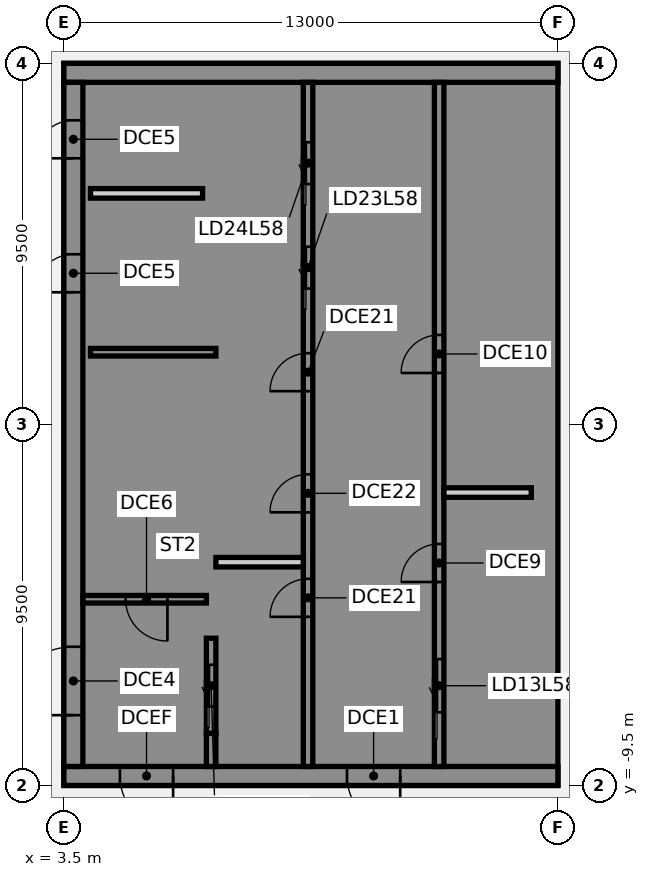
"""IFC4 building model, lengths in metres.
Left out: names, types, materials, properties, quantities, classifications, styles, units other than length and angle.
Written with IfcOpenShell. Run it as: python <this file> out.ifc"""

import sys

from ifc_helpers import new_model, si_unit, direction, frame, frame_2d, origin, place, context, subcontext, project, spatial, polyline, rectangle, outline, extrude, element, fill, save


model = new_model("IFC4")
c1 = context("Model", 3, precision=1e-05, world=origin(), true_north=direction((0.0, 1.0)))
c2 = subcontext(c1, "Body", "Model", "MODEL_VIEW")
j1 = project(units=[si_unit("LENGTHUNIT", "METRE"), si_unit("PLANEANGLEUNIT", "RADIAN")], contexts=[c1])
p1 = place(None, origin())
s1 = spatial("IfcSite", under=j1, at=p1, CompositionType="ELEMENT")
p2 = place(p1, origin())
s2 = spatial("IfcBuilding", under=s1, at=p2, CompositionType="ELEMENT")
p3 = place(p2, frame((0.0, 0.0, 230.7)))
s3 = spatial("IfcBuildingStorey", under=s2, at=p3, CompositionType="ELEMENT", Elevation=230.7)
p4 = place(p3, frame((16.5, -9.25, 0.0), z_axis=(0.0, 0.0, 1.0), x_axis=(-1.0, 0.0, 0.0)))
e1 = element("IfcWall", 1, at=p4, inside=s3, PredefinedType="SHEAR", context=c2, shape_type="SweptSolid", body=[
    extrude(rectangle(XDim=13.0, YDim=0.5, at=frame_2d((6.5, 0.0))), origin(), (0.0, 0.0, 1.0), 3.46),
])
p5 = place(p4, frame((4.15, 0.0, 0.0)))
e2 = element("IfcOpeningElement", 2, at=p5, cuts=e1, PredefinedType="OPENING", context=c2, shape_type="SweptSolid", body=[
    extrude(rectangle(XDim=1.4, YDim=2.1, at=frame_2d((0.7, 1.05))), frame((0.0, 0.26, 0.0), z_axis=(0.0, -1.0, 0.0), x_axis=(1.0, 0.0, 0.0)), (0.0, 0.0, 1.0), 0.52),
])
p6 = place(p4, frame((10.125, 0.0, 0.0)))
e3 = element("IfcOpeningElement", 3, at=p6, cuts=e1, PredefinedType="OPENING", context=c2, shape_type="SweptSolid", body=[
    extrude(rectangle(XDim=1.4, YDim=2.1, at=frame_2d((0.7, 1.05))), frame((0.0, 0.26, 0.0), z_axis=(0.0, -1.0, 0.0), x_axis=(1.0, 0.0, 0.0)), (0.0, 0.0, 1.0), 0.52),
])
p7 = place(p3, origin())
e4 = element("IfcWall", 4, at=p7, inside=s3, PredefinedType="SHEAR", context=c2, shape_type="SweptSolid", body=[
    extrude(outline(polyline([(13.5, -8.125), (13.5, -9.0), (16.0, -9.0), (16.5, -9.0), (16.5, 9.0), (16.0, 9.0), (13.5, 9.0), (13.5, 8.125), (16.0, 8.125), (16.0, 5.625), (13.5, 5.625), (13.5, 5.375), (16.0, 5.375), (16.0, -5.375), (13.5, -5.375), (13.5, -5.625), (16.0, -5.625), (16.0, -8.125), (13.5, -8.125)])), origin(), (0.0, 0.0, 1.0), 3.46),
])
p8 = place(p3, frame((16.5, 9.25, 0.0), z_axis=(0.0, 0.0, 1.0), x_axis=(-1.0, 0.0, 0.0)))
e5 = element("IfcWall", 5, at=p8, inside=s3, PredefinedType="SHEAR", context=c2, shape_type="SweptSolid", body=[
    extrude(rectangle(XDim=13.0, YDim=0.5, at=frame_2d((6.5, 0.0))), origin(), (0.0, 0.0, 1.0), 3.46),
])
p9 = place(p3, origin())
e6 = element("IfcWall", 6, at=p9, inside=s3, PredefinedType="SHEAR", context=c2, shape_type="SweptSolid", body=[
    extrude(outline(polyline([(9.8, -5.375), (7.5, -5.375), (7.5, 2.625), (9.8, 2.625), (9.8, 2.875), (7.5, 2.875), (7.5, 5.375), (9.8, 5.375), (9.8, 5.625), (7.5, 5.625), (7.5, 8.125), (9.8, 8.125), (9.8, 9.0), (7.5, 9.0), (7.25, 9.0), (7.25, -5.625), (7.5, -5.625), (9.8, -5.625), (9.8, -5.375)])), origin(), (0.0, 0.0, 1.0), 3.46),
])
p10 = place(p3, origin())
e7 = element("IfcWall", 7, at=p10, inside=s3, PredefinedType="SHEAR", context=c2, shape_type="SweptSolid", body=[
    extrude(outline(polyline([(7.5, -8.125), (7.5, -9.0), (9.8, -9.0), (9.8, -8.125), (9.8, -5.625), (9.55, -5.625), (9.55, -8.125), (7.5, -8.125)])), origin(), (0.0, 0.0, 1.0), 3.46),
])
p11 = place(p3, frame((7.375, -9.0, 0.0), z_axis=(0.0, 0.0, 1.0), x_axis=(0.0, 1.0, 0.0)))
e8 = element("IfcWall", 8, at=p11, inside=s3, PredefinedType="SHEAR", context=c2, shape_type="SweptSolid", body=[
    extrude(rectangle(XDim=0.875, YDim=0.25, at=frame_2d((0.438, 0.0))), origin(), (0.0, 0.0, 1.0), 3.46),
])
p12 = place(p3, frame((7.5, 1.9, 0.0), z_axis=(0.0, 0.0, 1.0), x_axis=(-1.0, 0.0, 0.0)))
e9 = element("IfcWall", 9, at=p12, inside=s3, PredefinedType="SHEAR", context=c2, shape_type="SweptSolid", body=[
    extrude(rectangle(XDim=3.3, YDim=0.2, at=frame_2d((1.65, 0.0))), origin(), (0.0, 0.0, 1.0), 3.46),
])
p13 = place(p3, frame((13.375, -9.0, 0.0), z_axis=(0.0, 0.0, 1.0), x_axis=(0.0, 1.0, 0.0)))
e10 = element("IfcWall", 10, at=p13, inside=s3, PredefinedType="SHEAR", context=c2, shape_type="SweptSolid", body=[
    extrude(rectangle(XDim=18.0, YDim=0.25, at=frame_2d((9.0, 0.0))), origin(), (0.0, 0.0, 1.0), 3.46),
])
p14 = place(p13, frame((1.425, 0.0, 0.0)))
e11 = element("IfcOpeningElement", 11, at=p14, cuts=e10, PredefinedType="OPENING", context=c2, shape_type="SweptSolid", body=[
    extrude(rectangle(XDim=1.4, YDim=2.1, at=frame_2d((0.7, 1.05))), frame((0.0, 0.135, 0.0), z_axis=(0.0, -1.0, 0.0), x_axis=(1.0, 0.0, 0.0)), (0.0, 0.0, 1.0), 0.27),
])
p15 = place(p13, frame((4.854, 0.0, 0.0)))
e12 = element("IfcOpeningElement", 12, at=p15, cuts=e10, PredefinedType="OPENING", context=c2, shape_type="SweptSolid", body=[
    extrude(rectangle(XDim=1.0, YDim=2.1, at=frame_2d((0.5, 1.05))), frame((0.0, 0.135, 0.0), z_axis=(0.0, -1.0, 0.0), x_axis=(1.0, 0.0, 0.0)), (0.0, 0.0, 1.0), 0.27),
])
p16 = place(p13, frame((10.354, 0.0, 0.0)))
e13 = element("IfcOpeningElement", 13, at=p16, cuts=e10, PredefinedType="OPENING", context=c2, shape_type="SweptSolid", body=[
    extrude(rectangle(XDim=1.0, YDim=2.1, at=frame_2d((0.5, 1.05))), frame((0.0, 0.135, 0.0), z_axis=(0.0, -1.0, 0.0), x_axis=(1.0, 0.0, 0.0)), (0.0, 0.0, 1.0), 0.27),
])
p17 = place(p3, frame((9.925, -9.0, 0.0), z_axis=(0.0, 0.0, 1.0), x_axis=(0.0, 1.0, 0.0)))
e14 = element("IfcWall", 14, at=p17, inside=s3, PredefinedType="SHEAR", context=c2, shape_type="SweptSolid", body=[
    extrude(rectangle(XDim=18.0, YDim=0.25, at=frame_2d((9.0, 0.0))), origin(), (0.0, 0.0, 1.0), 3.46),
])
p18 = place(p17, frame((12.575, 0.0, 0.0)))
e15 = element("IfcOpeningElement", 15, at=p18, cuts=e14, PredefinedType="OPENING", context=c2, shape_type="SweptSolid", body=[
    extrude(rectangle(XDim=1.1, YDim=2.1, at=frame_2d((0.55, 1.05))), frame((0.0, 0.135, 0.0), z_axis=(0.0, -1.0, 0.0), x_axis=(1.0, 0.0, 0.0)), (0.0, 0.0, 1.0), 0.27),
])
p19 = place(p17, frame((15.325, 0.0, 0.0)))
e16 = element("IfcOpeningElement", 16, at=p19, cuts=e14, PredefinedType="OPENING", context=c2, shape_type="SweptSolid", body=[
    extrude(rectangle(XDim=1.1, YDim=2.1, at=frame_2d((0.55, 1.05))), frame((0.0, 0.135, 0.0), z_axis=(0.0, -1.0, 0.0), x_axis=(1.0, 0.0, 0.0)), (0.0, 0.0, 1.0), 0.27),
])
p20 = place(p17, frame((3.938, 0.0, 0.0)))
e17 = element("IfcOpeningElement", 17, at=p20, cuts=e14, PredefinedType="OPENING", context=c2, shape_type="SweptSolid", body=[
    extrude(rectangle(XDim=1.0, YDim=2.1, at=frame_2d((0.5, 1.05))), frame((0.0, 0.135, 0.0), z_axis=(0.0, -1.0, 0.0), x_axis=(1.0, 0.0, 0.0)), (0.0, 0.0, 1.0), 0.27),
])
p21 = place(p17, frame((6.688, 0.0, 0.0)))
e18 = element("IfcOpeningElement", 18, at=p21, cuts=e14, PredefinedType="OPENING", context=c2, shape_type="SweptSolid", body=[
    extrude(rectangle(XDim=1.0, YDim=2.1, at=frame_2d((0.5, 1.05))), frame((0.0, 0.135, 0.0), z_axis=(0.0, -1.0, 0.0), x_axis=(1.0, 0.0, 0.0)), (0.0, 0.0, 1.0), 0.27),
])
p22 = place(p17, frame((9.875, 0.0, 0.0)))
e19 = element("IfcOpeningElement", 19, at=p22, cuts=e14, PredefinedType="OPENING", context=c2, shape_type="SweptSolid", body=[
    extrude(rectangle(XDim=1.0, YDim=2.1, at=frame_2d((0.5, 1.05))), frame((0.0, 0.135, 0.0), z_axis=(0.0, -1.0, 0.0), x_axis=(1.0, 0.0, 0.0)), (0.0, 0.0, 1.0), 0.27),
])
p23 = place(p3, frame((7.375, -8.125, 0.0), z_axis=(0.0, 0.0, 1.0), x_axis=(0.0, 1.0, 0.0)))
e20 = element("IfcWall", 20, at=p23, inside=s3, PredefinedType="SHEAR", context=c2, shape_type="SweptSolid", body=[
    extrude(rectangle(XDim=2.5, YDim=0.25, at=frame_2d((1.25, 0.0))), origin(), (0.0, 0.0, 1.0), 3.46),
])
p24 = place(p23, frame((0.7, 0.0, 0.0)))
e21 = element("IfcOpeningElement", 21, at=p24, cuts=e20, PredefinedType="OPENING", context=c2, shape_type="SweptSolid", body=[
    extrude(rectangle(XDim=1.1, YDim=2.1, at=frame_2d((0.55, 1.05))), frame((0.0, 0.135, 0.0), z_axis=(0.0, -1.0, 0.0), x_axis=(1.0, 0.0, 0.0)), (0.0, 0.0, 1.0), 0.27),
])
p25 = place(p3, frame((3.75, -9.0, 0.0), z_axis=(0.0, 0.0, 1.0), x_axis=(0.0, 1.0, 0.0)))
e22 = element("IfcWall", 22, at=p25, inside=s3, PredefinedType="SHEAR", context=c2, shape_type="SweptSolid", body=[
    extrude(rectangle(XDim=18.0, YDim=0.5, at=frame_2d((9.0, 0.0))), origin(), (0.0, 0.0, 1.0), 3.46),
])
p26 = place(p25, frame((1.35, 0.0, 0.0)))
e23 = element("IfcOpeningElement", 23, at=p26, cuts=e22, PredefinedType="OPENING", context=c2, shape_type="SweptSolid", body=[
    extrude(rectangle(XDim=1.8, YDim=2.1, at=frame_2d((0.9, 1.05))), frame((0.0, 0.26, 0.0), z_axis=(0.0, -1.0, 0.0), x_axis=(1.0, 0.0, 0.0)), (0.0, 0.0, 1.0), 0.52),
])
p27 = place(p25, frame((12.478, 0.0, 0.0)))
e24 = element("IfcOpeningElement", 24, at=p27, cuts=e22, PredefinedType="OPENING", context=c2, shape_type="SweptSolid", body=[
    extrude(rectangle(XDim=1.0, YDim=2.1, at=frame_2d((0.5, 1.05))), frame((0.0, 0.26, 0.0), z_axis=(0.0, -1.0, 0.0), x_axis=(1.0, 0.0, 0.0)), (0.0, 0.0, 1.0), 0.52),
])
p28 = place(p25, frame((16.002, 0.0, 0.0)))
e25 = element("IfcOpeningElement", 25, at=p28, cuts=e22, PredefinedType="OPENING", context=c2, shape_type="SweptSolid", body=[
    extrude(rectangle(XDim=1.0, YDim=2.1, at=frame_2d((0.5, 1.05))), frame((0.0, 0.26, 0.0), z_axis=(0.0, -1.0, 0.0), x_axis=(1.0, 0.0, 0.0)), (0.0, 0.0, 1.0), 0.52),
])
p29 = place(p3, frame((7.15, 6.08, 0.0), z_axis=(0.0, 0.0, 1.0), x_axis=(-1.0, 0.0, 0.0)))
e26 = element("IfcWall", 26, at=p29, inside=s3, PredefinedType="PARTITIONING", context=c2, shape_type="SweptSolid", body=[
    extrude(rectangle(XDim=2.95, YDim=0.25, at=frame_2d((1.475, 0.0))), origin(), (0.0, 0.0, 1.0), 3.46),
])
p30 = place(p3, frame((7.25, -4.6, 0.0), z_axis=(0.0, 0.0, 1.0), x_axis=(-1.0, 0.0, 0.0)))
e27 = element("IfcWall", 27, at=p30, inside=s3, PredefinedType="SHEAR", context=c2, shape_type="SweptSolid", body=[
    extrude(rectangle(XDim=3.25, YDim=0.2, at=frame_2d((1.625, 0.0))), origin(), (0.0, 0.0, 1.0), 3.46),
])
p31 = place(p30, frame((1.025, 0.0, 0.0)))
e28 = element("IfcOpeningElement", 28, at=p31, cuts=e27, PredefinedType="OPENING", context=c2, shape_type="SweptSolid", body=[
    extrude(rectangle(XDim=1.1, YDim=2.1, at=frame_2d((0.55, 1.05))), frame((0.0, 0.11, 0.0), z_axis=(0.0, -1.0, 0.0), x_axis=(1.0, 0.0, 0.0)), (0.0, 0.0, 1.0), 0.22),
])
for number, where, z_axis, x_axis in (
    (29, (15.8, -1.792, 0.0), (0.0, 0.0, 1.0), (-1.0, 0.0, 0.0)),
    (30, (9.8, -3.625, 0.0), (0.0, 0.0, 1.0), (-1.0, 0.0, 0.0)),
):
    element("IfcWall", number, at=place(p3, frame(where, z_axis=z_axis, x_axis=x_axis)), inside=s3, PredefinedType="PARTITIONING", context=c2, shape_type="SweptSolid", body=[
        extrude(rectangle(XDim=2.3, YDim=0.25, at=frame_2d((1.15, 0.0))), origin(), (0.0, 0.0, 1.0), 3.46),
    ])
p32 = place(p5, origin())
e31 = element("IfcDoor", 31, at=p32, inside=s3, OperationType="SINGLE_SWING_LEFT", PredefinedType="DOOR", context=c2, shape_type="SweptSolid", body=[
    extrude(rectangle(XDim=1.4, YDim=2.1, at=frame_2d((0.7, 1.05))), frame((0.0, 0.025, 0.0), z_axis=(0.0, -1.0, 0.0), x_axis=(1.0, 0.0, 0.0)), (0.0, 0.0, 1.0), 0.05),
])
fill(e2, e31)
p33 = place(p6, origin())
e32 = element("IfcDoor", 32, at=p33, inside=s3, OperationType="SINGLE_SWING_LEFT", PredefinedType="DOOR", context=c2, shape_type="SweptSolid", body=[
    extrude(rectangle(XDim=1.4, YDim=2.1, at=frame_2d((0.7, 1.05))), frame((0.0, 0.025, 0.0), z_axis=(0.0, -1.0, 0.0), x_axis=(1.0, 0.0, 0.0)), (0.0, 0.0, 1.0), 0.05),
])
fill(e3, e32)
p34 = place(p26, origin())
e33 = element("IfcDoor", 33, at=p34, inside=s3, OperationType="SINGLE_SWING_LEFT", PredefinedType="DOOR", context=c2, shape_type="SweptSolid", body=[
    extrude(rectangle(XDim=1.8, YDim=2.1, at=frame_2d((0.9, 1.05))), frame((0.0, 0.025, 0.0), z_axis=(0.0, -1.0, 0.0), x_axis=(1.0, 0.0, 0.0)), (0.0, 0.0, 1.0), 0.05),
])
fill(e23, e33)
p35 = place(p27, origin())
e34 = element("IfcDoor", 34, at=p35, inside=s3, OperationType="SINGLE_SWING_LEFT", PredefinedType="DOOR", context=c2, shape_type="SweptSolid", body=[
    extrude(rectangle(XDim=1.0, YDim=2.1, at=frame_2d((0.5, 1.05))), frame((0.0, -0.175, 0.0), z_axis=(0.0, -1.0, 0.0), x_axis=(1.0, 0.0, 0.0)), (0.0, 0.0, 1.0), 0.05),
])
fill(e24, e34)
p36 = place(p28, origin())
e35 = element("IfcDoor", 35, at=p36, inside=s3, OperationType="SINGLE_SWING_LEFT", PredefinedType="DOOR", context=c2, shape_type="SweptSolid", body=[
    extrude(rectangle(XDim=1.0, YDim=2.1, at=frame_2d((0.5, 1.05))), frame((0.0, -0.175, 0.0), z_axis=(0.0, -1.0, 0.0), x_axis=(1.0, 0.0, 0.0)), (0.0, 0.0, 1.0), 0.05),
])
fill(e25, e35)
p37 = place(p31, origin())
e36 = element("IfcDoor", 36, at=p37, inside=s3, OperationType="SINGLE_SWING_LEFT", PredefinedType="DOOR", context=c2, shape_type="SweptSolid", body=[
    extrude(rectangle(XDim=1.1, YDim=2.1, at=frame_2d((0.55, 1.05))), frame((0.0, 0.025, 0.0), z_axis=(0.0, -1.0, 0.0), x_axis=(1.0, 0.0, 0.0)), (0.0, 0.0, 1.0), 0.05),
])
fill(e28, e36)
p38 = place(p14, origin())
e37 = element("IfcDoor", 37, at=p38, inside=s3, OperationType="SLIDING_TO_LEFT", PredefinedType="DOOR", context=c2, shape_type="SweptSolid", body=[
    extrude(rectangle(XDim=1.4, YDim=2.1, at=frame_2d((0.7, 1.05))), frame((0.0, 0.025, 0.0), z_axis=(0.0, -1.0, 0.0), x_axis=(1.0, 0.0, 0.0)), (0.0, 0.0, 1.0), 0.05),
])
fill(e11, e37)
p39 = place(p24, origin())
e38 = element("IfcDoor", 38, at=p39, inside=s3, OperationType="SLIDING_TO_LEFT", PredefinedType="DOOR", context=c2, shape_type="SweptSolid", body=[
    extrude(rectangle(XDim=1.1, YDim=2.1, at=frame_2d((0.55, 1.05))), frame((0.0, 0.025, 0.0), z_axis=(0.0, -1.0, 0.0), x_axis=(1.0, 0.0, 0.0)), (0.0, 0.0, 1.0), 0.05),
])
fill(e21, e38)
p40 = place(p18, origin())
e39 = element("IfcDoor", 39, at=p40, inside=s3, OperationType="SLIDING_TO_LEFT", PredefinedType="DOOR", context=c2, shape_type="SweptSolid", body=[
    extrude(rectangle(XDim=1.1, YDim=2.1, at=frame_2d((0.55, 1.05))), frame((0.0, 0.025, 0.0), z_axis=(0.0, -1.0, 0.0), x_axis=(1.0, 0.0, 0.0)), (0.0, 0.0, 1.0), 0.05),
])
fill(e15, e39)
p41 = place(p19, origin())
e40 = element("IfcDoor", 40, at=p41, inside=s3, OperationType="SLIDING_TO_LEFT", PredefinedType="DOOR", context=c2, shape_type="SweptSolid", body=[
    extrude(rectangle(XDim=1.1, YDim=2.1, at=frame_2d((0.55, 1.05))), frame((0.0, 0.025, 0.0), z_axis=(0.0, -1.0, 0.0), x_axis=(1.0, 0.0, 0.0)), (0.0, 0.0, 1.0), 0.05),
])
fill(e16, e40)
p42 = place(p15, origin())
e41 = element("IfcDoor", 41, at=p42, inside=s3, OperationType="SINGLE_SWING_LEFT", PredefinedType="DOOR", context=c2, shape_type="SweptSolid", body=[
    extrude(rectangle(XDim=1.0, YDim=2.1, at=frame_2d((0.5, 1.05))), frame((0.0, 0.025, 0.0), z_axis=(0.0, -1.0, 0.0), x_axis=(1.0, 0.0, 0.0)), (0.0, 0.0, 1.0), 0.05),
])
fill(e12, e41)
p43 = place(p16, origin())
e42 = element("IfcDoor", 42, at=p43, inside=s3, OperationType="SINGLE_SWING_LEFT", PredefinedType="DOOR", context=c2, shape_type="SweptSolid", body=[
    extrude(rectangle(XDim=1.0, YDim=2.1, at=frame_2d((0.5, 1.05))), frame((0.0, 0.025, 0.0), z_axis=(0.0, -1.0, 0.0), x_axis=(1.0, 0.0, 0.0)), (0.0, 0.0, 1.0), 0.05),
])
fill(e13, e42)
p44 = place(p20, origin())
e43 = element("IfcDoor", 43, at=p44, inside=s3, OperationType="SINGLE_SWING_LEFT", PredefinedType="DOOR", context=c2, shape_type="SweptSolid", body=[
    extrude(rectangle(XDim=1.0, YDim=2.1, at=frame_2d((0.5, 1.05))), frame((0.0, 0.025, 0.0), z_axis=(0.0, -1.0, 0.0), x_axis=(1.0, 0.0, 0.0)), (0.0, 0.0, 1.0), 0.05),
])
fill(e17, e43)
p45 = place(p21, origin())
e44 = element("IfcDoor", 44, at=p45, inside=s3, OperationType="SINGLE_SWING_LEFT", PredefinedType="DOOR", context=c2, shape_type="SweptSolid", body=[
    extrude(rectangle(XDim=1.0, YDim=2.1, at=frame_2d((0.5, 1.05))), frame((0.0, 0.025, 0.0), z_axis=(0.0, -1.0, 0.0), x_axis=(1.0, 0.0, 0.0)), (0.0, 0.0, 1.0), 0.05),
])
fill(e18, e44)
p46 = place(p22, origin())
e45 = element("IfcDoor", 45, at=p46, inside=s3, OperationType="SINGLE_SWING_LEFT", PredefinedType="DOOR", context=c2, shape_type="SweptSolid", body=[
    extrude(rectangle(XDim=1.0, YDim=2.1, at=frame_2d((0.5, 1.05))), frame((0.0, 0.025, 0.0), z_axis=(0.0, -1.0, 0.0), x_axis=(1.0, 0.0, 0.0)), (0.0, 0.0, 1.0), 0.05),
])
fill(e19, e45)
save(model, sys.argv[1])
